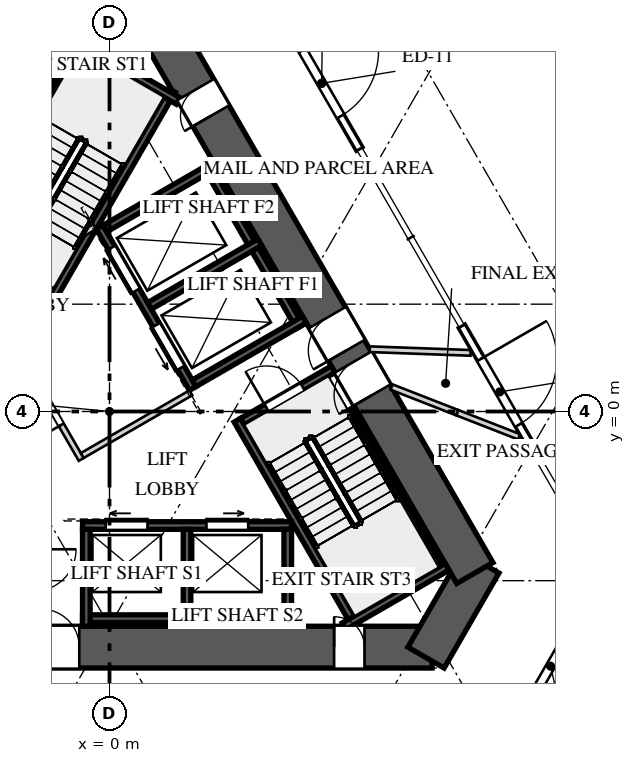
"""IFC4 building model, lengths in metres.
Left out: names, types, materials, properties, quantities, classifications, styles, units other than length and angle.
Written with IfcOpenShell. Run it as: python <this file> out.ifc"""

import sys

from ifc_helpers import new_model, si_unit, direction, frame, frame_2d, origin, place, context, subcontext, project, spatial, rectangle, extrude, element, fill, save


model = new_model("IFC4")
c1 = context("Model", 3, precision=1e-05, world=origin(), true_north=direction((0.0, 1.0)))
c2 = subcontext(c1, "Body", "Model", "MODEL_VIEW")
j1 = project(units=[si_unit("LENGTHUNIT", "METRE"), si_unit("PLANEANGLEUNIT", "RADIAN")], contexts=[c1])
p1 = place(None, origin())
s1 = spatial("IfcSite", under=j1, at=p1, CompositionType="ELEMENT")
p2 = place(p1, origin())
s2 = spatial("IfcBuilding", under=s1, at=p2, CompositionType="ELEMENT")
p3 = place(p2, origin())
s3 = spatial("IfcBuildingStorey", under=s2, at=p3, CompositionType="ELEMENT", Elevation=0.0)
p4 = place(p3, frame((-1.126, 10.45, 0.0), z_axis=(0.0, 0.0, 1.0), x_axis=(-0.500001757713, -0.866024388966, 0.0)))
e1 = element("IfcWall", 1, at=p4, inside=s3, PredefinedType="SHEAR", context=c2, shape_type="SweptSolid", body=[
    extrude(rectangle(XDim=16.974, YDim=1.1, at=frame_2d((8.487, 0.0))), origin(), (0.0, 0.0, 1.0), 10.0),
])
p5 = place(p4, frame((5.407, 0.0, 0.0)))
e2 = element("IfcOpeningElement", 2, at=p5, cuts=e1, PredefinedType="OPENING", context=c2, shape_type="SweptSolid", body=[
    extrude(rectangle(XDim=1.0, YDim=2.4, at=frame_2d((0.5, 1.2))), frame((0.0, 0.56, 0.0), z_axis=(0.0, -1.0, 0.0), x_axis=(1.0, 0.0, 0.0)), (0.0, 0.0, 1.0), 1.12),
])
p6 = place(p4, frame((6.692, 0.0, 0.0)))
e3 = element("IfcOpeningElement", 3, at=p6, cuts=e1, PredefinedType="OPENING", context=c2, shape_type="SweptSolid", body=[
    extrude(rectangle(XDim=1.0, YDim=2.4, at=frame_2d((0.5, 1.2))), frame((0.0, 0.56, 0.0), z_axis=(0.0, -1.0, 0.0), x_axis=(1.0, 0.0, 0.0)), (0.0, 0.0, 1.0), 1.12),
])
p7 = place(p3, frame((-8.487, -6.2, 0.0), z_axis=(0.0, 0.0, 1.0), x_axis=(1.0, 0.0, 0.0)))
e4 = element("IfcWall", 4, at=p7, inside=s3, PredefinedType="SHEAR", context=c2, shape_type="SweptSolid", body=[
    extrude(rectangle(XDim=16.974, YDim=1.1, at=frame_2d((8.487, 0.0))), origin(), (0.0, 0.0, 1.0), 10.0),
])
p8 = place(p7, frame((5.407, 0.0, 0.0)))
e5 = element("IfcOpeningElement", 5, at=p8, cuts=e4, PredefinedType="OPENING", context=c2, shape_type="SweptSolid", body=[
    extrude(rectangle(XDim=1.0, YDim=2.4, at=frame_2d((0.5, 1.2))), frame((0.0, 0.56, 0.0), z_axis=(0.0, -1.0, 0.0), x_axis=(1.0, 0.0, 0.0)), (0.0, 0.0, 1.0), 1.12),
])
p9 = place(p7, frame((6.692, 0.0, 0.0)))
e6 = element("IfcOpeningElement", 6, at=p9, cuts=e4, PredefinedType="OPENING", context=c2, shape_type="SweptSolid", body=[
    extrude(rectangle(XDim=1.0, YDim=2.4, at=frame_2d((0.5, 1.2))), frame((0.0, 0.56, 0.0), z_axis=(0.0, -1.0, 0.0), x_axis=(1.0, 0.0, 0.0)), (0.0, 0.0, 1.0), 1.12),
])
p10 = place(p7, frame((14.397, 0.0, 0.0)))
e7 = element("IfcOpeningElement", 7, at=p10, cuts=e4, PredefinedType="OPENING", context=c2, shape_type="SweptSolid", body=[
    extrude(rectangle(XDim=0.8, YDim=2.1, at=frame_2d((0.4, 1.05))), frame((0.0, 0.56, 0.0), z_axis=(0.0, -1.0, 0.0), x_axis=(1.0, 0.0, 0.0)), (0.0, 0.0, 1.0), 1.12),
])
p11 = place(p3, frame((8.328, -6.475, 0.0), z_axis=(0.0, 0.0, 1.0), x_axis=(0.499995765644, 0.866027848477, 0.0)))
e8 = element("IfcWall", 8, at=p11, inside=s3, PredefinedType="SHEAR", context=c2, shape_type="SweptSolid", body=[
    extrude(rectangle(XDim=2.887, YDim=1.1, at=frame_2d((1.443, 0.0))), origin(), (0.0, 0.0, 1.0), 10.0),
])
p12 = place(p3, frame((9.613, -4.25, 0.0), z_axis=(0.0, 0.0, 1.0), x_axis=(-0.500001757713, 0.866024388966, 0.0)))
e9 = element("IfcWall", 9, at=p12, inside=s3, PredefinedType="SHEAR", context=c2, shape_type="SweptSolid", body=[
    extrude(rectangle(XDim=16.974, YDim=1.1, at=frame_2d((8.487, 0.0))), origin(), (0.0, 0.0, 1.0), 10.0),
])
p13 = place(p12, frame((5.407, 0.0, 0.0)))
e10 = element("IfcOpeningElement", 10, at=p13, cuts=e9, PredefinedType="OPENING", context=c2, shape_type="SweptSolid", body=[
    extrude(rectangle(XDim=1.0, YDim=2.4, at=frame_2d((0.5, 1.2))), frame((0.0, 0.56, 0.0), z_axis=(0.0, -1.0, 0.0), x_axis=(1.0, 0.0, 0.0)), (0.0, 0.0, 1.0), 1.12),
])
p14 = place(p12, frame((6.762, 0.0, 0.0)))
e11 = element("IfcOpeningElement", 11, at=p14, cuts=e9, PredefinedType="OPENING", context=c2, shape_type="SweptSolid", body=[
    extrude(rectangle(XDim=1.0, YDim=2.4, at=frame_2d((0.5, 1.2))), frame((0.0, 0.56, 0.0), z_axis=(0.0, -1.0, 0.0), x_axis=(1.0, 0.0, 0.0)), (0.0, 0.0, 1.0), 1.12),
])
p15 = place(p12, frame((13.889, 0.0, 0.0)))
e12 = element("IfcOpeningElement", 12, at=p15, cuts=e9, PredefinedType="OPENING", context=c2, shape_type="SweptSolid", body=[
    extrude(rectangle(XDim=0.8, YDim=2.1, at=frame_2d((0.4, 1.05))), frame((0.0, 0.56, 0.0), z_axis=(0.0, -1.0, 0.0), x_axis=(1.0, 0.0, 0.0)), (0.0, 0.0, 1.0), 1.12),
])
p16 = place(p3, frame((4.58, 10.366, 0.0), z_axis=(0.0, 0.0, 1.0), x_axis=(0.49999894854, -0.866026010844, 0.0)))
e13 = element("IfcWall", 13, at=p16, inside=s3, PredefinedType="STANDARD", context=c2, shape_type="SweptSolid", body=[
    extrude(rectangle(XDim=4.0, YDim=0.2, at=frame_2d((2.0, 0.0))), origin(), (0.0, 0.0, 1.0), 4.0),
])
p17 = place(p16, frame((1.0, 0.0, 0.0)))
e14 = element("IfcOpeningElement", 14, at=p17, cuts=e13, PredefinedType="OPENING", context=c2, shape_type="SweptSolid", body=[
    extrude(rectangle(XDim=2.0, YDim=2.6, at=frame_2d((1.0, 1.3))), frame((0.0, 0.11, 0.0), z_axis=(0.0, -1.0, 0.0), x_axis=(1.0, 0.0, 0.0)), (0.0, 0.0, 1.0), 0.22),
])
p18 = place(p3, frame((9.268, 2.248, 0.0), z_axis=(0.0, 0.0, 1.0), x_axis=(0.49999894854, -0.866026010844, 0.0)))
e15 = element("IfcWall", 15, at=p18, inside=s3, PredefinedType="STANDARD", context=c2, shape_type="SweptSolid", body=[
    extrude(rectangle(XDim=4.0, YDim=0.2, at=frame_2d((2.0, 0.0))), origin(), (0.0, 0.0, 1.0), 4.0),
])
p19 = place(p18, frame((1.0, 0.0, 0.0)))
e16 = element("IfcOpeningElement", 16, at=p19, cuts=e15, PredefinedType="OPENING", context=c2, shape_type="SweptSolid", body=[
    extrude(rectangle(XDim=2.0, YDim=2.6, at=frame_2d((1.0, 1.3))), frame((0.0, 0.11, 0.0), z_axis=(0.0, -1.0, 0.0), x_axis=(1.0, 0.0, 0.0)), (0.0, 0.0, 1.0), 0.22),
])
p20 = place(p3, frame((13.019, -4.25, 0.0), z_axis=(0.0, 0.0, 1.0), x_axis=(-0.500018773155, -0.866014564827, 0.0)))
e17 = element("IfcWall", 17, at=p20, inside=s3, PredefinedType="STANDARD", context=c2, shape_type="SweptSolid", body=[
    extrude(rectangle(XDim=5.658, YDim=0.2, at=frame_2d((2.829, 0.0))), origin(), (0.0, 0.0, 1.0), 4.0),
])
p21 = place(p20, frame((1.829, 0.0, 0.0)))
e18 = element("IfcOpeningElement", 18, at=p21, cuts=e17, PredefinedType="OPENING", context=c2, shape_type="SweptSolid", body=[
    extrude(rectangle(XDim=2.0, YDim=2.6, at=frame_2d((1.0, 1.3))), frame((0.0, 0.11, 0.0), z_axis=(0.0, -1.0, 0.0), x_axis=(1.0, 0.0, 0.0)), (0.0, 0.0, 1.0), 0.22),
])
p22 = place(p3, frame((-0.68, 9.722, 0.0), z_axis=(0.0, 0.0, 1.0), x_axis=(-0.499974350878, -0.866040211805, 0.0)))
e19 = element("IfcWall", 19, at=p22, inside=s3, PredefinedType="SOLIDWALL", context=c2, shape_type="SweptSolid", body=[
    extrude(rectangle(XDim=4.95, YDim=0.2, at=frame_2d((2.475, 0.0))), origin(), (0.0, 0.0, 1.0), 9.65),
])
p23 = place(p3, frame((1.646, 8.45, 0.0), z_axis=(0.0, 0.0, 1.0), x_axis=(-0.500006002103, -0.866021938441, 0.0)))
e20 = element("IfcWall", 20, at=p23, inside=s3, PredefinedType="SOLIDWALL", context=c2, shape_type="SweptSolid", body=[
    extrude(rectangle(XDim=6.261, YDim=0.2, at=frame_2d((3.13, 0.0))), origin(), (0.0, 0.0, 1.0), 9.65),
])
p24 = place(p3, frame((1.806, 8.172, 0.0), z_axis=(0.0, 0.0, 1.0), x_axis=(-0.866054327916, 0.499949898588, 0.0)))
e21 = element("IfcWall", 21, at=p24, inside=s3, PredefinedType="SOLIDWALL", context=c2, shape_type="SweptSolid", body=[
    extrude(rectangle(XDim=3.128, YDim=0.2, at=frame_2d((1.564, 0.0))), origin(), (0.0, 0.0, 1.0), 9.65),
])
p25 = place(p3, frame((-1.521, 3.165, 0.0), z_axis=(0.0, 0.0, 1.0), x_axis=(-0.866027397988, 0.499996545922, 0.0)))
e22 = element("IfcWall", 22, at=p25, inside=s3, PredefinedType="SOLIDWALL", context=c2, shape_type="SweptSolid", body=[
    extrude(rectangle(XDim=2.75, YDim=0.2, at=frame_2d((1.375, 0.0))), origin(), (0.0, 0.0, 1.0), 9.65),
])
p26 = place(p25, frame((0.725, 0.0, 0.0)))
e23 = element("IfcOpeningElement", 23, at=p26, cuts=e22, PredefinedType="OPENING", context=c2, shape_type="SweptSolid", body=[
    extrude(rectangle(XDim=1.1, YDim=2.4, at=frame_2d((0.55, 1.2))), frame((0.0, 0.11, 0.0), z_axis=(0.0, -1.0, 0.0), x_axis=(1.0, 0.0, 0.0)), (0.0, 0.0, 1.0), 0.22),
])
p27 = place(p3, frame((8.76, -4.272, 0.0), z_axis=(0.0, 0.0, 1.0), x_axis=(-0.499974350878, 0.866040211805, 0.0)))
e24 = element("IfcWall", 24, at=p27, inside=s3, PredefinedType="SOLIDWALL", context=c2, shape_type="SweptSolid", body=[
    extrude(rectangle(XDim=4.95, YDim=0.2, at=frame_2d((2.475, 0.0))), origin(), (0.0, 0.0, 1.0), 9.65),
])
p28 = place(p3, frame((6.495, -5.65, 0.0), z_axis=(0.0, 0.0, 1.0), x_axis=(-0.499976754523, 0.866038824151, 0.0)))
e25 = element("IfcWall", 25, at=p28, inside=s3, PredefinedType="SOLIDWALL", context=c2, shape_type="SweptSolid", body=[
    extrude(rectangle(XDim=6.26, YDim=0.2, at=frame_2d((3.13, 0.0))), origin(), (0.0, 0.0, 1.0), 9.65),
])
p29 = place(p3, frame((6.174, -5.65, 0.0), z_axis=(0.0, 0.0, 1.0), x_axis=(0.866054327916, 0.499949898588, 0.0)))
e26 = element("IfcWall", 26, at=p29, inside=s3, PredefinedType="SOLIDWALL", context=c2, shape_type="SweptSolid", body=[
    extrude(rectangle(XDim=3.128, YDim=0.2, at=frame_2d((1.564, 0.0))), origin(), (0.0, 0.0, 1.0), 9.65),
])
p30 = place(p3, frame((3.501, -0.265, 0.0), z_axis=(0.0, 0.0, 1.0), x_axis=(0.866027397988, 0.499996545922, 0.0)))
e27 = element("IfcWall", 27, at=p30, inside=s3, PredefinedType="SOLIDWALL", context=c2, shape_type="SweptSolid", body=[
    extrude(rectangle(XDim=2.75, YDim=0.2, at=frame_2d((1.375, 0.0))), origin(), (0.0, 0.0, 1.0), 9.65),
])
p31 = place(p30, frame((0.725, 0.0, 0.0)))
e28 = element("IfcOpeningElement", 28, at=p31, cuts=e27, PredefinedType="OPENING", context=c2, shape_type="SweptSolid", body=[
    extrude(rectangle(XDim=1.1, YDim=2.4, at=frame_2d((0.55, 1.2))), frame((0.0, 0.11, 0.0), z_axis=(0.0, -1.0, 0.0), x_axis=(1.0, 0.0, 0.0)), (0.0, 0.0, 1.0), 0.22),
])
p32 = place(p3, frame((-0.71, -3.0, 0.0), z_axis=(0.0, 0.0, 1.0), x_axis=(1.0, 0.0, 0.0)))
e29 = element("IfcWall", 29, at=p32, inside=s3, PredefinedType="SOLIDWALL", context=c2, shape_type="SweptSolid", body=[
    extrude(rectangle(XDim=5.5, YDim=0.2, at=frame_2d((2.75, 0.0))), origin(), (0.0, 0.0, 1.0), 9.65),
])
p33 = place(p32, frame((0.61, 0.0, 0.0)))
e30 = element("IfcOpeningElement", 30, at=p33, cuts=e29, PredefinedType="OPENING", context=c2, shape_type="SweptSolid", body=[
    extrude(rectangle(XDim=1.1, YDim=2.1, at=frame_2d((0.55, 1.05))), frame((0.0, 0.11, 0.0), z_axis=(0.0, -1.0, 0.0), x_axis=(1.0, 0.0, 0.0)), (0.0, 0.0, 1.0), 0.22),
])
p34 = place(p32, frame((3.26, 0.0, 0.0)))
e31 = element("IfcOpeningElement", 31, at=p34, cuts=e29, PredefinedType="OPENING", context=c2, shape_type="SweptSolid", body=[
    extrude(rectangle(XDim=1.1, YDim=2.1, at=frame_2d((0.55, 1.05))), frame((0.0, 0.11, 0.0), z_axis=(0.0, -1.0, 0.0), x_axis=(1.0, 0.0, 0.0)), (0.0, 0.0, 1.0), 0.22),
])
p35 = place(p3, frame((-0.71, -5.45, 0.0), z_axis=(0.0, 0.0, 1.0), x_axis=(1.0, 0.0, 0.0)))
e32 = element("IfcWall", 32, at=p35, inside=s3, PredefinedType="SOLIDWALL", context=c2, shape_type="SweptSolid", body=[
    extrude(rectangle(XDim=5.5, YDim=0.2, at=frame_2d((2.75, 0.0))), origin(), (0.0, 0.0, 1.0), 9.65),
])
for number, where, z_axis, x_axis in (
    (33, (-0.61, -3.1, 0.0), (0.0, 0.0, 1.0), (0.0, -1.0, 0.0)),
    (34, (2.04, -3.1, 0.0), (0.0, 0.0, 1.0), (0.0, -1.0, 0.0)),
    (35, (4.69, -3.1, 0.0), (0.0, 0.0, 1.0), (0.0, -1.0, 0.0)),
):
    element("IfcWall", number, at=place(p3, frame(where, z_axis=z_axis, x_axis=x_axis)), inside=s3, PredefinedType="SOLIDWALL", context=c2, shape_type="SweptSolid", body=[
        extrude(rectangle(XDim=2.55, YDim=0.2, at=frame_2d((1.275, 0.0))), origin(), (0.0, 0.0, 1.0), 9.65),
    ])
p36 = place(p3, frame((2.19, 0.606, 0.0), z_axis=(0.0, 0.0, 1.0), x_axis=(-0.500002801628, 0.866023786258, 0.0)))
e36 = element("IfcWall", 36, at=p36, inside=s3, PredefinedType="SOLIDWALL", context=c2, shape_type="SweptSolid", body=[
    extrude(rectangle(XDim=4.9, YDim=0.2, at=frame_2d((2.45, 0.0))), origin(), (0.0, 0.0, 1.0), 9.65),
])
p37 = place(p36, frame((0.625, 0.0, 0.0)))
e37 = element("IfcOpeningElement", 37, at=p37, cuts=e36, PredefinedType="OPENING", context=c2, shape_type="SweptSolid", body=[
    extrude(rectangle(XDim=1.3, YDim=2.1, at=frame_2d((0.65, 1.05))), frame((0.0, 0.11, 0.0), z_axis=(0.0, -1.0, 0.0), x_axis=(1.0, 0.0, 0.0)), (0.0, 0.0, 1.0), 0.22),
])
p38 = place(p36, frame((2.975, 0.0, 0.0)))
e38 = element("IfcOpeningElement", 38, at=p38, cuts=e36, PredefinedType="OPENING", context=c2, shape_type="SweptSolid", body=[
    extrude(rectangle(XDim=1.3, YDim=2.1, at=frame_2d((0.65, 1.05))), frame((0.0, 0.11, 0.0), z_axis=(0.0, -1.0, 0.0), x_axis=(1.0, 0.0, 0.0)), (0.0, 0.0, 1.0), 0.22),
])
p39 = place(p3, frame((5.005, 2.231, 0.0), z_axis=(0.0, 0.0, 1.0), x_axis=(-0.500002801628, 0.866023786258, 0.0)))
e39 = element("IfcWall", 39, at=p39, inside=s3, PredefinedType="SOLIDWALL", context=c2, shape_type="SweptSolid", body=[
    extrude(rectangle(XDim=4.9, YDim=0.2, at=frame_2d((2.45, 0.0))), origin(), (0.0, 0.0, 1.0), 9.65),
])
p40 = place(p3, frame((2.227, 0.743, 0.0), z_axis=(0.0, 0.0, 1.0), x_axis=(0.866014461049, 0.500018952895, 0.0)))
e40 = element("IfcWall", 40, at=p40, inside=s3, PredefinedType="SOLIDWALL", context=c2, shape_type="SweptSolid", body=[
    extrude(rectangle(XDim=3.35, YDim=0.2, at=frame_2d((1.675, 0.0))), origin(), (0.0, 0.0, 1.0), 9.65),
])
p41 = place(p3, frame((1.052, 2.778, 0.0), z_axis=(0.0, 0.0, 1.0), x_axis=(0.866032680314, 0.499987396469, 0.0)))
e41 = element("IfcWall", 41, at=p41, inside=s3, PredefinedType="SOLIDWALL", context=c2, shape_type="SweptSolid", body=[
    extrude(rectangle(XDim=3.35, YDim=0.2, at=frame_2d((1.675, 0.0))), origin(), (0.0, 0.0, 1.0), 9.65),
])
p42 = place(p3, frame((-0.123, 4.813, 0.0), z_axis=(0.0, 0.0, 1.0), x_axis=(0.866014461049, 0.500018952895, 0.0)))
e42 = element("IfcWall", 42, at=p42, inside=s3, PredefinedType="SOLIDWALL", context=c2, shape_type="SweptSolid", body=[
    extrude(rectangle(XDim=3.35, YDim=0.2, at=frame_2d((1.675, 0.0))), origin(), (0.0, 0.0, 1.0), 9.65),
])
p43 = place(p3, frame((7.423, 0.643, 0.0), z_axis=(0.0, 0.0, 1.0), x_axis=(0.931641653134, -0.363378356738, 0.0)))
e43 = element("IfcWall", 43, at=p43, inside=s3, PredefinedType="PARTITIONING", context=c2, shape_type="SweptSolid", body=[
    extrude(rectangle(XDim=1.858, YDim=0.15, at=frame_2d((0.929, 0.0))), origin(), (0.0, 0.0, 1.0), 9.65),
])
p44 = place(p3, frame((9.154, -0.032, 0.0), z_axis=(0.0, 0.0, 1.0), x_axis=(0.931575304138, -0.363548418675, 0.0)))
e44 = element("IfcWall", 44, at=p44, inside=s3, PredefinedType="PARTITIONING", context=c2, shape_type="SweptSolid", body=[
    extrude(rectangle(XDim=1.742, YDim=0.15, at=frame_2d((0.871, 0.0))), origin(), (0.0, 0.0, 1.0), 8.75),
])
p45 = place(p3, frame((6.848, 1.639, 0.0), z_axis=(0.0, 0.0, 1.0), x_axis=(0.999343619738, -0.036226091285, 0.0)))
e45 = element("IfcWall", 45, at=p45, inside=s3, PredefinedType="PARTITIONING", context=c2, shape_type="SweptSolid", body=[
    extrude(rectangle(XDim=2.655, YDim=0.15, at=frame_2d((1.328, 0.0))), origin(), (0.0, 0.0, 1.0), 9.65),
])
p46 = place(p3, frame((-0.744, -1.261, 0.0), z_axis=(0.0, 0.0, 1.0), x_axis=(-0.500004234368, 0.866022959057, 0.0)))
e46 = element("IfcWall", 46, at=p46, inside=s3, PredefinedType="PARTITIONING", context=c2, shape_type="SweptSolid", body=[
    extrude(rectangle(XDim=3.125, YDim=0.15, at=frame_2d((1.562, 0.0))), origin(), (0.0, 0.0, 1.0), 9.65),
])
p47 = place(p46, frame((1.05, 0.0, 0.0)))
e47 = element("IfcOpeningElement", 47, at=p47, cuts=e46, PredefinedType="OPENING", context=c2, shape_type="SweptSolid", body=[
    extrude(rectangle(XDim=1.1, YDim=2.4, at=frame_2d((0.55, 1.2))), frame((0.0, 0.085, 0.0), z_axis=(0.0, -1.0, 0.0), x_axis=(1.0, 0.0, 0.0)), (0.0, 0.0, 1.0), 0.17),
])
p48 = place(p3, frame((-0.717, -1.159, 0.0), z_axis=(0.0, 0.0, 1.0), x_axis=(0.866008176907, 0.50002983664, 0.0)))
e48 = element("IfcWall", 48, at=p48, inside=s3, PredefinedType="PARTITIONING", context=c2, shape_type="SweptSolid", body=[
    extrude(rectangle(XDim=3.3, YDim=0.15, at=frame_2d((1.65, 0.0))), origin(), (0.0, 0.0, 1.0), 9.65),
])
p49 = place(p3, frame((-2.178, 1.372, 0.0), z_axis=(0.0, 0.0, 1.0), x_axis=(0.258808958833, 0.96592852884, 0.0)))
e49 = element("IfcWall", 49, at=p49, inside=s3, PredefinedType="PARTITIONING", context=c2, shape_type="SweptSolid", body=[
    extrude(rectangle(XDim=2.903, YDim=0.15, at=frame_2d((1.451, 0.0))), origin(), (0.0, 0.0, 1.0), 9.65),
])
p50 = place(p3, frame((-1.51, 4.215, 0.0), z_axis=(0.0, 0.0, 1.0), x_axis=(0.866085525409, 0.49989585183, 0.0)))
e50 = element("IfcWall", 50, at=p50, inside=s3, PredefinedType="PARTITIONING", context=c2, shape_type="SweptSolid", body=[
    extrude(rectangle(XDim=1.3, YDim=0.15, at=frame_2d((0.65, 0.0))), origin(), (0.0, 0.0, 1.0), 9.65),
])
p51 = place(p17, origin())
e51 = element("IfcDoor", 51, at=p51, inside=s3, OperationType="DOUBLE_DOOR_SINGLE_SWING", PredefinedType="DOOR", context=c2, shape_type="SweptSolid", body=[
    extrude(rectangle(XDim=2.0, YDim=2.6, at=frame_2d((1.0, 1.3))), frame((0.0, 0.025, 0.0), z_axis=(0.0, -1.0, 0.0), x_axis=(1.0, 0.0, 0.0)), (0.0, 0.0, 1.0), 0.05),
])
fill(e14, e51)
p52 = place(p19, origin())
e52 = element("IfcDoor", 52, at=p52, inside=s3, OperationType="DOUBLE_DOOR_SINGLE_SWING", PredefinedType="DOOR", context=c2, shape_type="SweptSolid", body=[
    extrude(rectangle(XDim=2.0, YDim=2.6, at=frame_2d((1.0, 1.3))), frame((0.0, 0.025, 0.0), z_axis=(0.0, -1.0, 0.0), x_axis=(1.0, 0.0, 0.0)), (0.0, 0.0, 1.0), 0.05),
])
fill(e16, e52)
p53 = place(p21, origin())
e53 = element("IfcDoor", 53, at=p53, inside=s3, OperationType="DOUBLE_DOOR_SINGLE_SWING", PredefinedType="DOOR", context=c2, shape_type="SweptSolid", body=[
    extrude(rectangle(XDim=2.0, YDim=2.6, at=frame_2d((1.0, 1.3))), frame((0.0, 0.025, 0.0), z_axis=(0.0, -1.0, 0.0), x_axis=(1.0, 0.0, 0.0)), (0.0, 0.0, 1.0), 0.05),
])
fill(e18, e53)
p54 = place(p31, origin())
e54 = element("IfcDoor", 54, at=p54, inside=s3, OperationType="SINGLE_SWING_RIGHT", PredefinedType="DOOR", context=c2, shape_type="SweptSolid", body=[
    extrude(rectangle(XDim=1.1, YDim=2.4, at=frame_2d((0.55, 1.2))), frame((0.0, 0.025, 0.0), z_axis=(0.0, -1.0, 0.0), x_axis=(1.0, 0.0, 0.0)), (0.0, 0.0, 1.0), 0.05),
])
fill(e28, e54)
p55 = place(p33, origin())
e55 = element("IfcDoor", 55, at=p55, inside=s3, OperationType="SLIDING_TO_LEFT", PredefinedType="DOOR", context=c2, shape_type="SweptSolid", body=[
    extrude(rectangle(XDim=1.1, YDim=2.1, at=frame_2d((0.55, 1.05))), frame((0.0, 0.025, 0.0), z_axis=(0.0, -1.0, 0.0), x_axis=(1.0, 0.0, 0.0)), (0.0, 0.0, 1.0), 0.05),
])
fill(e30, e55)
p56 = place(p34, origin())
e56 = element("IfcDoor", 56, at=p56, inside=s3, OperationType="SLIDING_TO_RIGHT", PredefinedType="DOOR", context=c2, shape_type="SweptSolid", body=[
    extrude(rectangle(XDim=1.1, YDim=2.1, at=frame_2d((0.55, 1.05))), frame((0.0, 0.025, 0.0), z_axis=(0.0, -1.0, 0.0), x_axis=(1.0, 0.0, 0.0)), (0.0, 0.0, 1.0), 0.05),
])
fill(e31, e56)
p57 = place(p37, origin())
e57 = element("IfcDoor", 57, at=p57, inside=s3, OperationType="SLIDING_TO_LEFT", PredefinedType="DOOR", context=c2, shape_type="SweptSolid", body=[
    extrude(rectangle(XDim=1.3, YDim=2.1, at=frame_2d((0.65, 1.05))), frame((0.0, 0.025, 0.0), z_axis=(0.0, -1.0, 0.0), x_axis=(1.0, 0.0, 0.0)), (0.0, 0.0, 1.0), 0.05),
])
fill(e37, e57)
p58 = place(p38, origin())
e58 = element("IfcDoor", 58, at=p58, inside=s3, OperationType="SLIDING_TO_RIGHT", PredefinedType="DOOR", context=c2, shape_type="SweptSolid", body=[
    extrude(rectangle(XDim=1.3, YDim=2.1, at=frame_2d((0.65, 1.05))), frame((0.0, 0.025, 0.0), z_axis=(0.0, -1.0, 0.0), x_axis=(1.0, 0.0, 0.0)), (0.0, 0.0, 1.0), 0.05),
])
fill(e38, e58)
p59 = place(p13, origin())
e59 = element("IfcDoor", 59, at=p59, inside=s3, OperationType="SINGLE_SWING_LEFT", PredefinedType="DOOR", context=c2, shape_type="SweptSolid", body=[
    extrude(rectangle(XDim=1.0, YDim=2.4, at=frame_2d((0.5, 1.2))), frame((0.0, 0.025, 0.0), z_axis=(0.0, -1.0, 0.0), x_axis=(1.0, 0.0, 0.0)), (0.0, 0.0, 1.0), 0.05),
])
fill(e10, e59)
p60 = place(p47, origin())
e60 = element("IfcDoor", 60, at=p60, inside=s3, OperationType="SINGLE_SWING_RIGHT", PredefinedType="DOOR", context=c2, shape_type="SweptSolid", body=[
    extrude(rectangle(XDim=1.1, YDim=2.4, at=frame_2d((0.55, 1.2))), frame((0.0, 0.025, 0.0), z_axis=(0.0, -1.0, 0.0), x_axis=(1.0, 0.0, 0.0)), (0.0, 0.0, 1.0), 0.05),
])
fill(e47, e60)
p61 = place(p9, origin())
e61 = element("IfcDoor", 61, at=p61, inside=s3, OperationType="SINGLE_SWING_RIGHT", PredefinedType="DOOR", context=c2, shape_type="SweptSolid", body=[
    extrude(rectangle(XDim=1.0, YDim=2.4, at=frame_2d((0.5, 1.2))), frame((0.0, 0.025, 0.0), z_axis=(0.0, -1.0, 0.0), x_axis=(1.0, 0.0, 0.0)), (0.0, 0.0, 1.0), 0.05),
])
fill(e6, e61)
p62 = place(p14, origin())
e62 = element("IfcDoor", 62, at=p62, inside=s3, OperationType="SINGLE_SWING_LEFT", PredefinedType="DOOR", context=c2, shape_type="SweptSolid", body=[
    extrude(rectangle(XDim=1.0, YDim=2.4, at=frame_2d((0.5, 1.2))), frame((0.0, 0.025, 0.0), z_axis=(0.0, -1.0, 0.0), x_axis=(1.0, 0.0, 0.0)), (0.0, 0.0, 1.0), 0.05),
])
fill(e11, e62)
p63 = place(p10, origin())
e63 = element("IfcDoor", 63, at=p63, inside=s3, OperationType="SINGLE_SWING_RIGHT", PredefinedType="DOOR", context=c2, shape_type="SweptSolid", body=[
    extrude(rectangle(XDim=0.8, YDim=2.1, at=frame_2d((0.4, 1.05))), frame((0.0, 0.025, 0.0), z_axis=(0.0, -1.0, 0.0), x_axis=(1.0, 0.0, 0.0)), (0.0, 0.0, 1.0), 0.05),
])
fill(e7, e63)
p64 = place(p15, origin())
e64 = element("IfcDoor", 64, at=p64, inside=s3, OperationType="SINGLE_SWING_LEFT", PredefinedType="DOOR", context=c2, shape_type="SweptSolid", body=[
    extrude(rectangle(XDim=0.8, YDim=2.1, at=frame_2d((0.4, 1.05))), frame((0.0, 0.025, 0.0), z_axis=(0.0, -1.0, 0.0), x_axis=(1.0, 0.0, 0.0)), (0.0, 0.0, 1.0), 0.05),
])
fill(e12, e64)
save(model, sys.argv[1])
